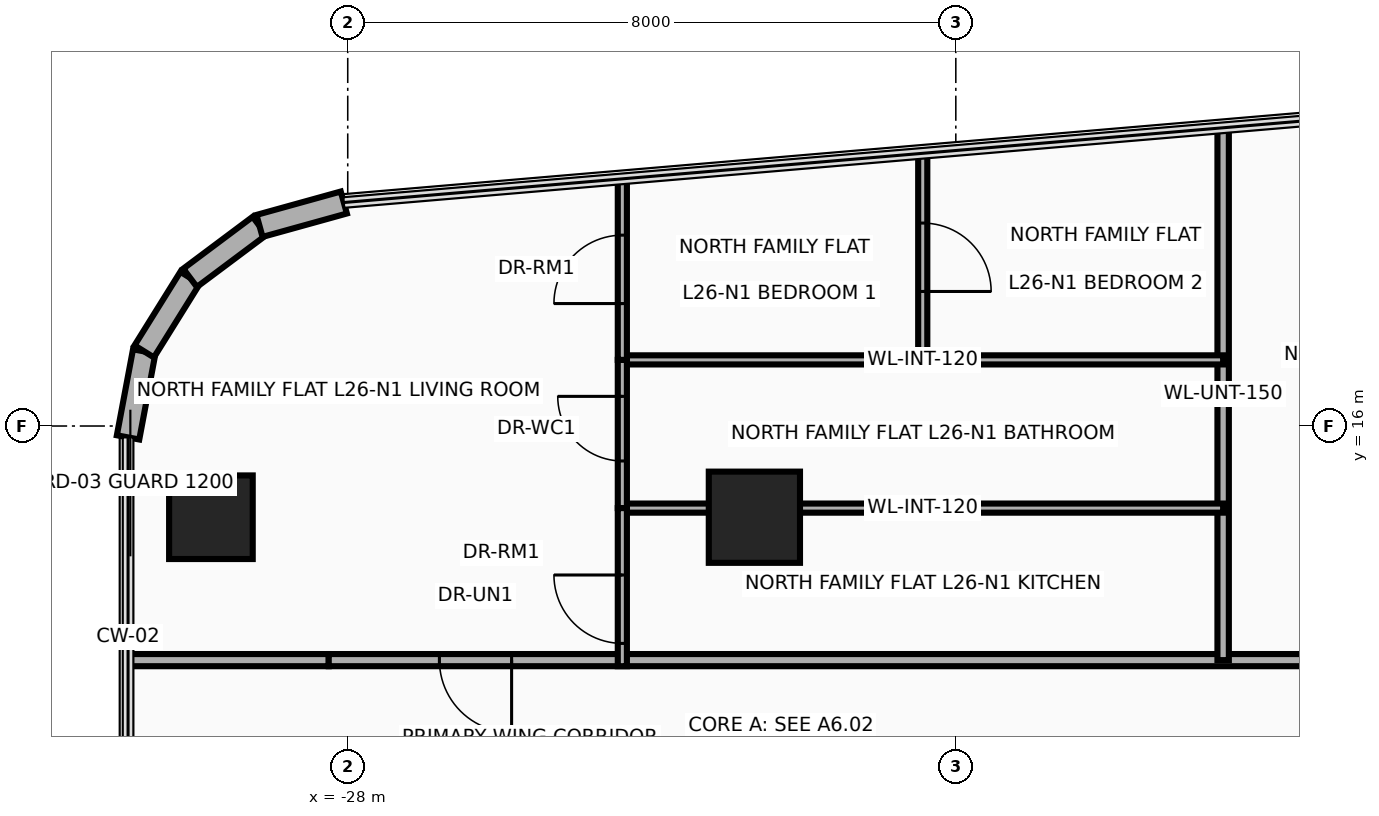
"""IFC4 building model, lengths in metres.
Left out: names, types, materials, properties, quantities, classifications, styles, units other than length and angle.
Written with IfcOpenShell. Run it as: python <this file> out.ifc"""

import sys

from ifc_helpers import new_model, si_unit, direction, frame, frame_2d, origin, origin_2d, place, context, subcontext, project, spatial, rectangle, circle, extrude, source, transform, mapped, element, fill, save


model = new_model("IFC4")
c1 = context("Model", 3, precision=1e-05, world=origin(), true_north=direction((0.0, 1.0)))
c2 = subcontext(c1, "Body", "Model", "MODEL_VIEW")
j1 = project(units=[si_unit("LENGTHUNIT", "METRE"), si_unit("PLANEANGLEUNIT", "RADIAN")], contexts=[c1])
p1 = place(None, origin())
s1 = spatial("IfcSite", under=j1, at=p1, CompositionType="ELEMENT")
p2 = place(p1, origin())
s2 = spatial("IfcBuilding", under=s1, at=p2, CompositionType="ELEMENT")
p3 = place(p2, frame((0.0, 0.0, 105.7)))
s3 = spatial("IfcBuildingStorey", under=s2, at=p3, CompositionType="ELEMENT", Elevation=105.7)
m1 = source(origin(), c2, "Body", "SweptSolid", [
    extrude(circle(Radius=0.55, at=origin_2d()), origin(), (0.0, 0.0, 1.0), 3.7),
])
p4 = place(p3, frame((-29.8, 14.8, 0.0), z_axis=(0.0, 0.0, 1.0), x_axis=(1.0, 0.0, 0.0)))
e1 = element("IfcColumn", 1, at=p4, inside=s3, PredefinedType="COLUMN", context=c2, shape_type="MappedRepresentation", body=[
    mapped(m1, transform((0.0, 0.0, 0.0), x_axis=(1.0, 0.0, 0.0), y_axis=(0.0, 1.0, 0.0), z_axis=(0.0, 0.0, 1.0), scale=1.0)),
])
m2 = source(origin(), c2, "Body", "SweptSolid", [
    extrude(rectangle(XDim=1.2, YDim=1.2, at=origin_2d()), origin(), (0.0, 0.0, 1.0), 3.7),
])
p5 = place(p3, frame((-22.65, 14.8, 0.0), z_axis=(0.0, 0.0, 1.0), x_axis=(1.0, 0.0, 0.0)))
e2 = element("IfcColumn", 2, at=p5, inside=s3, PredefinedType="COLUMN", context=c2, shape_type="MappedRepresentation", body=[
    mapped(m2, transform((0.0, 0.0, 0.0), x_axis=(1.0, 0.0, 0.0), y_axis=(0.0, 1.0, 0.0), z_axis=(0.0, 0.0, 1.0), scale=1.0)),
])
p6 = place(p3, frame((-30.89, 15.85, 0.0), z_axis=(0.0, 0.0, 1.0), x_axis=(0.184557499391, 0.982821718023, 0.0)))
e3 = element("IfcWall", 3, at=p6, inside=s3, PredefinedType="SOLIDWALL", context=c2, shape_type="SweptSolid", body=[
    extrude(rectangle(XDim=1.151, YDim=0.3, at=frame_2d((0.575, 0.0))), origin(), (0.0, 0.0, 1.0), 3.46),
])
p7 = place(p3, frame((-30.677, 16.981, 0.0), z_axis=(0.0, 0.0, 1.0), x_axis=(0.52880576008, 0.848742875143, 0.0)))
e4 = element("IfcWall", 4, at=p7, inside=s3, PredefinedType="SOLIDWALL", context=c2, shape_type="SweptSolid", body=[
    extrude(rectangle(XDim=1.141, YDim=0.3, at=frame_2d((0.57, 0.0))), origin(), (0.0, 0.0, 1.0), 3.46),
])
p8 = place(p3, frame((-30.074, 17.95, 0.0), z_axis=(0.0, 0.0, 1.0), x_axis=(0.800975009324, 0.598697782223, 0.0)))
e5 = element("IfcWall", 5, at=p8, inside=s3, PredefinedType="SOLIDWALL", context=c2, shape_type="SweptSolid", body=[
    extrude(rectangle(XDim=1.141, YDim=0.3, at=frame_2d((0.57, 0.0))), origin(), (0.0, 0.0, 1.0), 3.46),
])
p9 = place(p3, frame((-29.161, 18.633, 0.0), z_axis=(0.0, 0.0, 1.0), x_axis=(0.963624193367, 0.267260947313, 0.0)))
e6 = element("IfcWall", 6, at=p9, inside=s3, PredefinedType="SOLIDWALL", context=c2, shape_type="SweptSolid", body=[
    extrude(rectangle(XDim=1.151, YDim=0.3, at=frame_2d((0.575, 0.0))), origin(), (0.0, 0.0, 1.0), 3.46),
])
p10 = place(p3, frame((-30.89, 12.92, 0.0), z_axis=(0.0, 0.0, 1.0), x_axis=(1.0, 0.0, 0.0)))
e7 = element("IfcWall", 7, at=p10, inside=s3, PredefinedType="PARTITIONING", context=c2, shape_type="SweptSolid", body=[
    extrude(rectangle(XDim=2.64, YDim=0.16, at=frame_2d((1.32, 0.0))), origin(), (0.0, 0.0, 1.0), 2.896),
])
p11 = place(p3, frame((-28.25, 12.92, 0.0), z_axis=(0.0, 0.0, 1.0), x_axis=(1.0, 0.0, 0.0)))
e8 = element("IfcWall", 8, at=p11, inside=s3, PredefinedType="PARTITIONING", context=c2, shape_type="SweptSolid", body=[
    extrude(rectangle(XDim=41.8, YDim=0.16, at=frame_2d((20.9, 0.0))), origin(), (0.0, 0.0, 1.0), 2.666),
])
p12 = place(p11, frame((1.456, 0.0, 0.0)))
e9 = element("IfcOpeningElement", 9, at=p12, cuts=e8, PredefinedType="OPENING", context=c2, shape_type="SweptSolid", body=[
    extrude(rectangle(XDim=0.95, YDim=2.15, at=frame_2d((0.475, 1.075))), frame((0.0, 0.095, 0.0), z_axis=(0.0, -1.0, 0.0), x_axis=(1.0, 0.0, 0.0)), (0.0, 0.0, 1.0), 0.19),
])
p13 = place(p11, frame((14.167, 0.0, 0.0)))
e10 = element("IfcOpeningElement", 10, at=p13, cuts=e8, PredefinedType="OPENING", context=c2, shape_type="SweptSolid", body=[
    extrude(rectangle(XDim=0.95, YDim=2.15, at=frame_2d((0.475, 1.075))), frame((0.0, 0.095, 0.0), z_axis=(0.0, -1.0, 0.0), x_axis=(1.0, 0.0, 0.0)), (0.0, 0.0, 1.0), 0.19),
])
p14 = place(p11, frame((30.587, 0.0, 0.0)))
e11 = element("IfcOpeningElement", 11, at=p14, cuts=e8, PredefinedType="OPENING", context=c2, shape_type="SweptSolid", body=[
    extrude(rectangle(XDim=0.95, YDim=2.15, at=frame_2d((0.475, 1.075))), frame((0.0, 0.095, 0.0), z_axis=(0.0, -1.0, 0.0), x_axis=(1.0, 0.0, 0.0)), (0.0, 0.0, 1.0), 0.19),
])
p15 = place(p3, frame((-16.483, 12.92, 0.0), z_axis=(0.0, 0.0, 1.0), x_axis=(0.0, 1.0, 0.0)))
e12 = element("IfcWall", 12, at=p15, inside=s3, PredefinedType="PARTITIONING", context=c2, shape_type="SweptSolid", body=[
    extrude(rectangle(XDim=7.004, YDim=0.15, at=frame_2d((3.502, 0.0))), origin(), (0.0, 0.0, 1.0), 2.666),
])
p16 = place(p3, frame((-24.387, 14.92, 0.0), z_axis=(0.0, 0.0, 1.0), x_axis=(1.0, 0.0, 0.0)))
e13 = element("IfcWall", 13, at=p16, inside=s3, PredefinedType="PARTITIONING", context=c2, shape_type="SweptSolid", body=[
    extrude(rectangle(XDim=7.904, YDim=0.12, at=frame_2d((3.952, 0.0))), origin(), (0.0, 0.0, 1.0), 2.666),
])
p17 = place(p3, frame((-24.387, 16.87, 0.0), z_axis=(0.0, 0.0, 1.0), x_axis=(1.0, 0.0, 0.0)))
e14 = element("IfcWall", 14, at=p17, inside=s3, PredefinedType="PARTITIONING", context=c2, shape_type="SweptSolid", body=[
    extrude(rectangle(XDim=7.904, YDim=0.12, at=frame_2d((3.952, 0.0))), origin(), (0.0, 0.0, 1.0), 3.46),
])
p18 = place(p3, frame((-24.387, 14.92, 0.0), z_axis=(0.0, 0.0, 1.0), x_axis=(0.0, 1.0, 0.0)))
e15 = element("IfcWall", 15, at=p18, inside=s3, PredefinedType="PARTITIONING", context=c2, shape_type="SweptSolid", body=[
    extrude(rectangle(XDim=1.95, YDim=0.12, at=frame_2d((0.975, 0.0))), origin(), (0.0, 0.0, 1.0), 2.666),
])
p19 = place(p18, frame((0.62, 0.0, 0.0)))
e16 = element("IfcOpeningElement", 16, at=p19, cuts=e15, PredefinedType="OPENING", context=c2, shape_type="SweptSolid", body=[
    extrude(rectangle(XDim=0.85, YDim=2.1, at=frame_2d((0.425, 1.05))), frame((0.0, 0.075, 0.0), z_axis=(0.0, -1.0, 0.0), x_axis=(1.0, 0.0, 0.0)), (0.0, 0.0, 1.0), 0.15),
])
p20 = place(p3, frame((-24.387, 12.84, 0.0), z_axis=(0.0, 0.0, 1.0), x_axis=(0.0, 1.0, 0.0)))
e17 = element("IfcWall", 17, at=p20, inside=s3, PredefinedType="PARTITIONING", context=c2, shape_type="SweptSolid", body=[
    extrude(rectangle(XDim=2.08, YDim=0.12, at=frame_2d((1.04, 0.0))), origin(), (0.0, 0.0, 1.0), 2.666),
])
p21 = place(p20, frame((0.3, 0.0, 0.0)))
e18 = element("IfcOpeningElement", 18, at=p21, cuts=e17, PredefinedType="OPENING", context=c2, shape_type="SweptSolid", body=[
    extrude(rectangle(XDim=0.9, YDim=2.1, at=frame_2d((0.45, 1.05))), frame((0.0, 0.075, 0.0), z_axis=(0.0, -1.0, 0.0), x_axis=(1.0, 0.0, 0.0)), (0.0, 0.0, 1.0), 0.15),
])
p22 = place(p3, frame((-24.387, 16.87, 0.0), z_axis=(0.0, 0.0, 1.0), x_axis=(0.0, 1.0, 0.0)))
e19 = element("IfcWall", 19, at=p22, inside=s3, PredefinedType="PARTITIONING", context=c2, shape_type="SweptSolid", body=[
    extrude(rectangle(XDim=2.382, YDim=0.12, at=frame_2d((1.191, 0.0))), origin(), (0.0, 0.0, 1.0), 3.46),
])
p23 = place(p22, frame((0.741, 0.0, 0.0)))
e20 = element("IfcOpeningElement", 20, at=p23, cuts=e19, PredefinedType="OPENING", context=c2, shape_type="SweptSolid", body=[
    extrude(rectangle(XDim=0.9, YDim=2.1, at=frame_2d((0.45, 1.05))), frame((0.0, 0.075, 0.0), z_axis=(0.0, -1.0, 0.0), x_axis=(1.0, 0.0, 0.0)), (0.0, 0.0, 1.0), 0.15),
])
p24 = place(p3, frame((-20.435, 16.87, 0.0), z_axis=(0.0, 0.0, 1.0), x_axis=(0.0, 1.0, 0.0)))
e21 = element("IfcWall", 21, at=p24, inside=s3, PredefinedType="PARTITIONING", context=c2, shape_type="SweptSolid", body=[
    extrude(rectangle(XDim=2.718, YDim=0.12, at=frame_2d((1.359, 0.0))), origin(), (0.0, 0.0, 1.0), 3.46),
])
p25 = place(p24, frame((0.9, 0.0, 0.0)))
e22 = element("IfcOpeningElement", 22, at=p25, cuts=e21, PredefinedType="OPENING", context=c2, shape_type="SweptSolid", body=[
    extrude(rectangle(XDim=0.9, YDim=2.1, at=frame_2d((0.45, 1.05))), frame((0.0, 0.075, 0.0), z_axis=(0.0, -1.0, 0.0), x_axis=(1.0, 0.0, 0.0)), (0.0, 0.0, 1.0), 0.15),
])
p26 = place(p12, frame((0.95, 0.0, 0.0), z_axis=(0.0, 0.0, 1.0), x_axis=(-1.0, 0.0, 0.0)))
e23 = element("IfcDoor", 23, at=p26, inside=s3, OperationType="SINGLE_SWING_LEFT", PredefinedType="DOOR", context=c2, shape_type="SweptSolid", body=[
    extrude(rectangle(XDim=0.95, YDim=2.15, at=frame_2d((0.475, 1.075))), frame((0.0, 0.025, 0.0), z_axis=(0.0, -1.0, 0.0), x_axis=(1.0, 0.0, 0.0)), (0.0, 0.0, 1.0), 0.05),
])
fill(e9, e23)
p27 = place(p19, origin())
e24 = element("IfcDoor", 24, at=p27, inside=s3, OperationType="SINGLE_SWING_RIGHT", PredefinedType="DOOR", context=c2, shape_type="SweptSolid", body=[
    extrude(rectangle(XDim=0.85, YDim=2.1, at=frame_2d((0.425, 1.05))), frame((0.0, 0.025, 0.0), z_axis=(0.0, -1.0, 0.0), x_axis=(1.0, 0.0, 0.0)), (0.0, 0.0, 1.0), 0.05),
])
fill(e16, e24)
p28 = place(p21, origin())
e25 = element("IfcDoor", 25, at=p28, inside=s3, OperationType="SINGLE_SWING_LEFT", PredefinedType="DOOR", context=c2, shape_type="SweptSolid", body=[
    extrude(rectangle(XDim=0.9, YDim=2.1, at=frame_2d((0.45, 1.05))), frame((0.0, 0.025, 0.0), z_axis=(0.0, -1.0, 0.0), x_axis=(1.0, 0.0, 0.0)), (0.0, 0.0, 1.0), 0.05),
])
fill(e18, e25)
p29 = place(p23, origin())
e26 = element("IfcDoor", 26, at=p29, inside=s3, OperationType="SINGLE_SWING_RIGHT", PredefinedType="DOOR", context=c2, shape_type="SweptSolid", body=[
    extrude(rectangle(XDim=0.9, YDim=2.1, at=frame_2d((0.45, 1.05))), frame((0.0, 0.025, 0.0), z_axis=(0.0, -1.0, 0.0), x_axis=(1.0, 0.0, 0.0)), (0.0, 0.0, 1.0), 0.05),
])
fill(e20, e26)
p30 = place(p25, frame((0.9, 0.0, 0.0), z_axis=(0.0, 0.0, 1.0), x_axis=(-1.0, 0.0, 0.0)))
e27 = element("IfcDoor", 27, at=p30, inside=s3, OperationType="SINGLE_SWING_LEFT", PredefinedType="DOOR", context=c2, shape_type="SweptSolid", body=[
    extrude(rectangle(XDim=0.9, YDim=2.1, at=frame_2d((0.45, 1.05))), frame((0.0, 0.025, 0.0), z_axis=(0.0, -1.0, 0.0), x_axis=(1.0, 0.0, 0.0)), (0.0, 0.0, 1.0), 0.05),
])
fill(e22, e27)
save(model, sys.argv[1])
